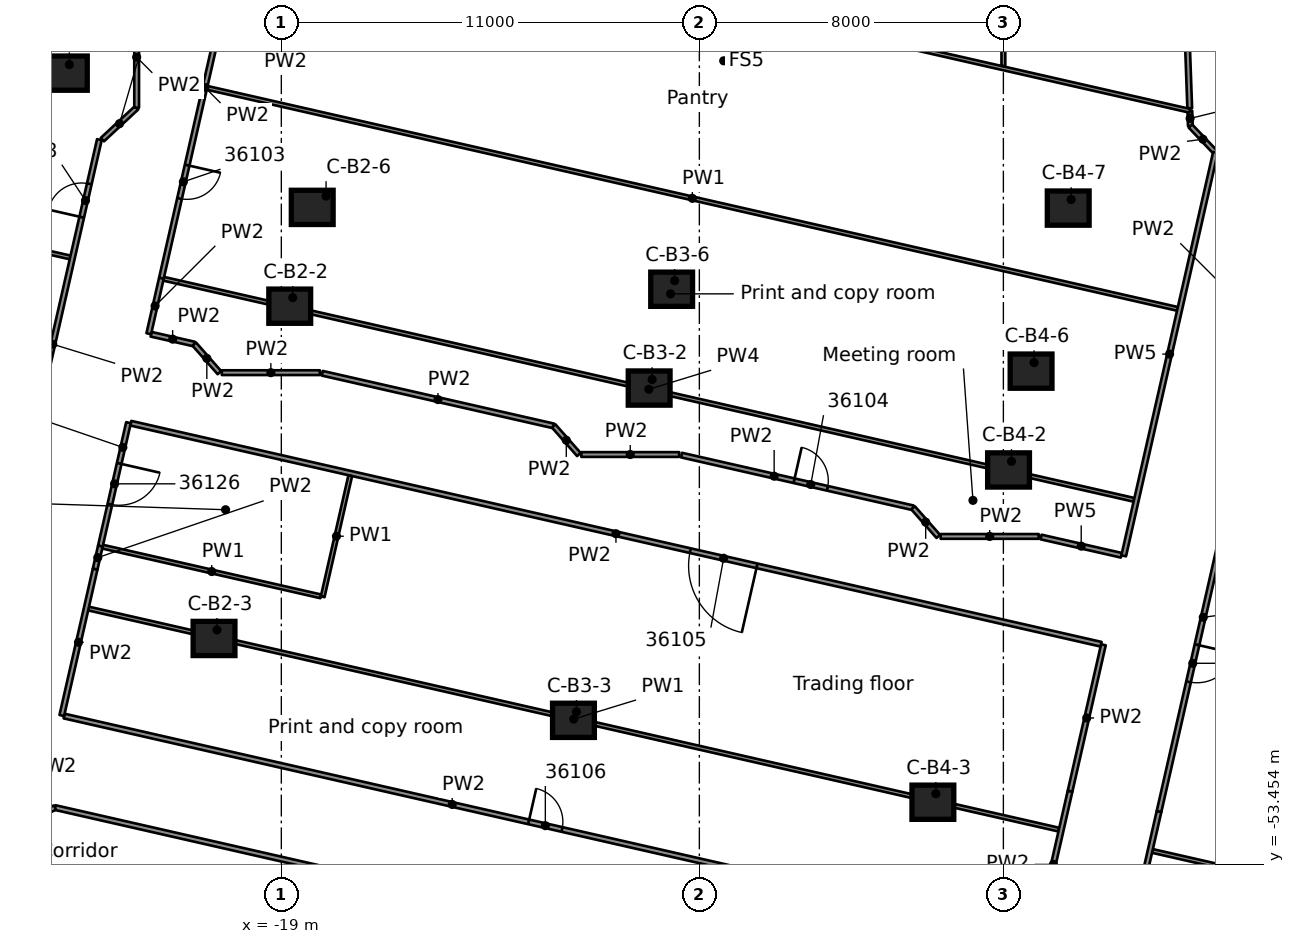
"""IFC4 building model, lengths in metres.
Left out: names, types, materials, properties, quantities, classifications, styles, units other than length and angle.
Written with IfcOpenShell. Run it as: python <this file> out.ifc"""

import sys

from ifc_helpers import new_model, si_unit, direction, frame, frame_2d, origin, origin_2d, place, context, subcontext, project, spatial, rectangle, extrude, element, fill, save


model = new_model("IFC4")
c1 = context("Model", 3, precision=1e-05, world=origin(), true_north=direction((0.0, 1.0)))
c2 = subcontext(c1, "Body", "Model", "MODEL_VIEW")
j1 = project(units=[si_unit("LENGTHUNIT", "METRE"), si_unit("PLANEANGLEUNIT", "RADIAN")], contexts=[c1])
p1 = place(None, origin())
s1 = spatial("IfcSite", under=j1, at=p1, CompositionType="ELEMENT")
p2 = place(p1, origin())
s2 = spatial("IfcBuilding", under=s1, at=p2, CompositionType="ELEMENT")
p3 = place(p2, frame((0.0, 0.0, 181.1)))
s3 = spatial("IfcBuildingStorey", under=s2, at=p3, CompositionType="ELEMENT", Elevation=181.1)
for number, where, z_axis, x_axis in (
    (1, (-24.657, -32.632, 0.0), (0.0, 0.0, 1.0), (1.0, 0.0, 0.0)),
    (2, (-18.779, -38.764, 0.0), (0.0, 0.0, 1.0), (1.0, 0.0, 0.0)),
    (3, (-20.771, -47.507, 0.0), (0.0, 0.0, 1.0), (1.0, 0.0, 0.0)),
    (4, (-18.187, -36.164, 0.0), (0.0, 0.0, 1.0), (1.0, 0.0, 0.0)),
    (5, (-9.321, -40.918, 0.0), (0.0, 0.0, 1.0), (1.0, 0.0, 0.0)),
    (6, (-11.313, -49.661, 0.0), (0.0, 0.0, 1.0), (1.0, 0.0, 0.0)),
    (7, (-8.729, -38.318, 0.0), (0.0, 0.0, 1.0), (1.0, 0.0, 0.0)),
    (8, (0.136, -43.073, 0.0), (0.0, 0.0, 1.0), (1.0, 0.0, 0.0)),
    (9, (-1.855, -51.816, 0.0), (0.0, 0.0, 1.0), (1.0, 0.0, 0.0)),
    (10, (0.729, -40.473, 0.0), (0.0, 0.0, 1.0), (1.0, 0.0, 0.0)),
    (11, (1.706, -36.183, 0.0), (0.0, 0.0, 1.0), (1.0, 0.0, 0.0)),
):
    element("IfcColumn", number, at=place(p3, frame(where, z_axis=z_axis, x_axis=x_axis)), inside=s3, PredefinedType="COLUMN", context=c2, shape_type="SweptSolid", body=[
        extrude(rectangle(XDim=1.1, YDim=0.9, at=origin_2d()), origin(), (0.0, 0.0, 1.0), 3.5),
    ])
p4 = place(p3, frame((4.907, -33.623, 0.0), z_axis=(0.0, 0.0, 1.0), x_axis=(0.034692866757, -0.999398021309, 0.0)))
e12 = element("IfcWall", 12, at=p4, inside=s3, PredefinedType="PARTITIONING", context=c2, shape_type="SweptSolid", body=[
    extrude(rectangle(XDim=0.401, YDim=0.125, at=frame_2d((0.201, 0.0))), origin(), (0.0, 0.0, 1.0), 3.06),
])
p5 = place(p3, frame((4.904, -33.555, 0.0), z_axis=(0.0, 0.0, 1.0), x_axis=(-0.035916720211, 0.999354786454, 0.0)))
e13 = element("IfcWall", 13, at=p5, inside=s3, PredefinedType="PARTITIONING", context=c2, shape_type="SweptSolid", body=[
    extrude(rectangle(XDim=17.904, YDim=0.125, at=frame_2d((8.952, 0.0))), origin(), (0.0, 0.0, 1.0), 2.425),
])
p6 = place(p5, frame((10.623, 0.0, 0.0)))
e14 = element("IfcOpeningElement", 14, at=p6, cuts=e13, PredefinedType="OPENING", context=c2, shape_type="SweptSolid", body=[
    extrude(rectangle(XDim=1.1, YDim=2.1, at=frame_2d((0.55, 1.05))), frame((0.0, 0.073, 0.0), z_axis=(0.0, -1.0, 0.0), x_axis=(1.0, 0.0, 0.0)), (0.0, 0.0, 1.0), 0.145),
])
p7 = place(p3, frame((0.344, -57.719, 0.0), z_axis=(0.0, 0.0, 1.0), x_axis=(-0.97501877272, 0.222122472621, 0.0)))
e15 = element("IfcWall", 15, at=p7, inside=s3, PredefinedType="PARTITIONING", context=c2, shape_type="SweptSolid", body=[
    extrude(rectangle(XDim=25.949, YDim=0.125, at=frame_2d((12.975, 0.0))), origin(), (0.0, 0.0, 1.0), 3.06),
])
p8 = place(p7, frame((12.6, 0.0, 0.0)))
e16 = element("IfcOpeningElement", 16, at=p8, cuts=e15, PredefinedType="OPENING", context=c2, shape_type="SweptSolid", body=[
    extrude(rectangle(XDim=0.9, YDim=2.1, at=frame_2d((0.45, 1.05))), frame((0.0, 0.073, 0.0), z_axis=(0.0, -1.0, 0.0), x_axis=(1.0, 0.0, 0.0)), (0.0, 0.0, 1.0), 0.145),
])
p9 = place(p3, frame((-24.716, -49.548, 0.0), z_axis=(0.0, 0.0, 1.0), x_axis=(0.975023843859, -0.222100211404, 0.0)))
e17 = element("IfcWall", 17, at=p9, inside=s3, PredefinedType="PARTITIONING", context=c2, shape_type="SweptSolid", body=[
    extrude(rectangle(XDim=26.186, YDim=0.125, at=frame_2d((13.093, 0.0))), origin(), (0.0, 0.0, 1.0), 3.06),
])
p10 = place(p9, frame((12.538, 0.0, 0.0)))
e18 = element("IfcOpeningElement", 18, at=p10, cuts=e17, PredefinedType="OPENING", context=c2, shape_type="SweptSolid", body=[
    extrude(rectangle(XDim=0.9, YDim=2.1, at=frame_2d((0.45, 1.05))), frame((0.0, 0.073, 0.0), z_axis=(0.0, -1.0, 0.0), x_axis=(1.0, 0.0, 0.0)), (0.0, 0.0, 1.0), 0.145),
])
p11 = place(p3, frame((-24.072, -46.72, 0.0), z_axis=(0.0, 0.0, 1.0), x_axis=(0.975013747988, -0.222144527805, 0.0)))
e19 = element("IfcWall", 19, at=p11, inside=s3, PredefinedType="PARTITIONING", context=c2, shape_type="SweptSolid", body=[
    extrude(rectangle(XDim=26.186, YDim=0.1, at=frame_2d((13.093, 0.0))), origin(), (0.0, 0.0, 1.0), 3.06),
])
p12 = place(p3, frame((3.923, -53.098, 0.0), z_axis=(0.0, 0.0, 1.0), x_axis=(0.975005836175, -0.222179250661, 0.0)))
e20 = element("IfcWall", 20, at=p12, inside=s3, PredefinedType="PARTITIONING", context=c2, shape_type="SweptSolid", body=[
    extrude(rectangle(XDim=4.632, YDim=0.1, at=frame_2d((2.316, 0.0))), origin(), (0.0, 0.0, 1.0), 3.06),
])
p13 = place(p3, frame((-23.701, -45.092, 0.0), z_axis=(0.0, 0.0, 1.0), x_axis=(0.9750468239, -0.22199930451, 0.0)))
e21 = element("IfcWall", 21, at=p13, inside=s3, PredefinedType="PARTITIONING", context=c2, shape_type="SweptSolid", body=[
    extrude(rectangle(XDim=5.887, YDim=0.1, at=frame_2d((2.943, 0.0))), origin(), (0.0, 0.0, 1.0), 3.06),
])
p14 = place(p3, frame((2.571, -47.659, 0.0), z_axis=(0.0, 0.0, 1.0), x_axis=(-0.975023843859, 0.222100211404, 0.0)))
e22 = element("IfcWall", 22, at=p14, inside=s3, PredefinedType="PARTITIONING", context=c2, shape_type="SweptSolid", body=[
    extrude(rectangle(XDim=26.186, YDim=0.125, at=frame_2d((13.093, 0.0))), origin(), (0.0, 0.0, 1.0), 3.06),
])
p15 = place(p14, frame((9.287, 0.0, 0.0)))
e23 = element("IfcOpeningElement", 23, at=p15, cuts=e22, PredefinedType="OPENING", context=c2, shape_type="SweptSolid", body=[
    extrude(rectangle(XDim=1.8, YDim=2.1, at=frame_2d((0.9, 1.05))), frame((0.0, 0.073, 0.0), z_axis=(0.0, -1.0, 0.0), x_axis=(1.0, 0.0, 0.0)), (0.0, 0.0, 1.0), 0.145),
])
p16 = place(p3, frame((-22.427, -39.502, 0.0), z_axis=(0.0, 0.0, 1.0), x_axis=(0.97511430892, -0.221702694026, 0.0)))
e24 = element("IfcWall", 24, at=p16, inside=s3, PredefinedType="PARTITIONING", context=c2, shape_type="SweptSolid", body=[
    extrude(rectangle(XDim=1.164, YDim=0.125, at=frame_2d((0.582, 0.0))), origin(), (0.0, 0.0, 1.0), 3.06),
])
p17 = place(p3, frame((-17.924, -40.528, 0.0), z_axis=(0.0, 0.0, 1.0), x_axis=(0.975041788435, -0.2220214197, 0.0)))
e25 = element("IfcWall", 25, at=p17, inside=s3, PredefinedType="PARTITIONING", context=c2, shape_type="SweptSolid", body=[
    extrude(rectangle(XDim=6.247, YDim=0.125, at=frame_2d((3.124, 0.0))), origin(), (0.0, 0.0, 1.0), 3.06),
])
p18 = place(p3, frame((-8.469, -42.682, 0.0), z_axis=(0.0, 0.0, 1.0), x_axis=(0.975048737106, -0.22199090132, 0.0)))
e26 = element("IfcWall", 26, at=p18, inside=s3, PredefinedType="PARTITIONING", context=c2, shape_type="SweptSolid", body=[
    extrude(rectangle(XDim=6.249, YDim=0.125, at=frame_2d((3.125, 0.0))), origin(), (0.0, 0.0, 1.0), 3.06),
])
p19 = place(p18, frame((3.038, 0.0, 0.0)))
e27 = element("IfcOpeningElement", 27, at=p19, cuts=e26, PredefinedType="OPENING", context=c2, shape_type="SweptSolid", body=[
    extrude(rectangle(XDim=0.9, YDim=2.1, at=frame_2d((0.45, 1.05))), frame((0.0, 0.073, 0.0), z_axis=(0.0, -1.0, 0.0), x_axis=(1.0, 0.0, 0.0)), (0.0, 0.0, 1.0), 0.145),
])
p20 = place(p3, frame((0.991, -44.837, 0.0), z_axis=(0.0, 0.0, 1.0), x_axis=(0.97505868901, -0.22194718513, 0.0)))
e28 = element("IfcWall", 28, at=p20, inside=s3, PredefinedType="PARTITIONING", context=c2, shape_type="SweptSolid", body=[
    extrude(rectangle(XDim=2.168, YDim=0.125, at=frame_2d((1.084, 0.0))), origin(), (0.0, 0.0, 1.0), 2.425),
])
p21 = place(p3, frame((-29.073, -36.453, 0.0), z_axis=(0.0, 0.0, 1.0), x_axis=(0.975041099452, -0.222024445455, 0.0)))
e29 = element("IfcWall", 29, at=p21, inside=s3, PredefinedType="PARTITIONING", context=c2, shape_type="SweptSolid", body=[
    extrude(rectangle(XDim=4.63, YDim=0.1, at=frame_2d((2.315, 0.0))), origin(), (0.0, 0.0, 1.0), 3.06),
])
p22 = place(p3, frame((-22.095, -38.043, 0.0), z_axis=(0.0, 0.0, 1.0), x_axis=(0.975023843859, -0.222100211404, 0.0)))
e30 = element("IfcWall", 30, at=p22, inside=s3, PredefinedType="PARTITIONING", context=c2, shape_type="SweptSolid", body=[
    extrude(rectangle(XDim=26.186, YDim=0.1, at=frame_2d((13.093, 0.0))), origin(), (0.0, 0.0, 1.0), 2.425),
])
p23 = place(p3, frame((-20.951, -33.019, 0.0), z_axis=(0.0, 0.0, 1.0), x_axis=(0.975025683381, -0.222092135715, 0.0)))
e31 = element("IfcWall", 31, at=p23, inside=s3, PredefinedType="PARTITIONING", context=c2, shape_type="SweptSolid", body=[
    extrude(rectangle(XDim=26.187, YDim=0.1, at=frame_2d((13.094, 0.0))), origin(), (0.0, 0.0, 1.0), 3.06),
])
p24 = place(p3, frame((-19.806, -27.994, 0.0), z_axis=(0.0, 0.0, 1.0), x_axis=(0.975023541408, -0.222101539165, 0.0)))
e32 = element("IfcWall", 32, at=p24, inside=s3, PredefinedType="PARTITIONING", context=c2, shape_type="SweptSolid", body=[
    extrude(rectangle(XDim=25.345, YDim=0.1, at=frame_2d((12.672, 0.0))), origin(), (0.0, 0.0, 1.0), 3.06),
])
p25 = place(p3, frame((-1.651, -44.822, 0.0), z_axis=(0.0, 0.0, 1.0), x_axis=(1.0, 0.0, 0.0)))
e33 = element("IfcWall", 33, at=p25, inside=s3, PredefinedType="PARTITIONING", context=c2, shape_type="SweptSolid", body=[
    extrude(rectangle(XDim=2.581, YDim=0.125, at=frame_2d((1.291, 0.0))), origin(), (0.0, 0.0, 1.0), 3.06),
])
p26 = place(p3, frame((-11.107, -42.667, 0.0), z_axis=(0.0, 0.0, 1.0), x_axis=(1.0, 0.0, 0.0)))
e34 = element("IfcWall", 34, at=p26, inside=s3, PredefinedType="PARTITIONING", context=c2, shape_type="SweptSolid", body=[
    extrude(rectangle(XDim=2.577, YDim=0.125, at=frame_2d((1.289, 0.0))), origin(), (0.0, 0.0, 1.0), 3.06),
])
p27 = place(p3, frame((-20.567, -40.513, 0.0), z_axis=(0.0, 0.0, 1.0), x_axis=(1.0, 0.0, 0.0)))
e35 = element("IfcWall", 35, at=p27, inside=s3, PredefinedType="PARTITIONING", context=c2, shape_type="SweptSolid", body=[
    extrude(rectangle(XDim=2.582, YDim=0.125, at=frame_2d((1.291, 0.0))), origin(), (0.0, 0.0, 1.0), 3.06),
])
p28 = place(p3, frame((-23.709, -34.381, 0.0), z_axis=(0.0, 0.0, 1.0), x_axis=(0.732207421562, 0.681081707147, 0.0)))
e36 = element("IfcWall", 36, at=p28, inside=s3, PredefinedType="PARTITIONING", context=c2, shape_type="SweptSolid", body=[
    extrude(rectangle(XDim=1.232, YDim=0.125, at=frame_2d((0.616, 0.0))), origin(), (0.0, 0.0, 1.0), 3.06),
])
p29 = place(p3, frame((4.922, -34.024, 0.0), z_axis=(0.0, 0.0, 1.0), x_axis=(0.689011074604, -0.724750811709, 0.0)))
e37 = element("IfcWall", 37, at=p29, inside=s3, PredefinedType="PARTITIONING", context=c2, shape_type="SweptSolid", body=[
    extrude(rectangle(XDim=0.956, YDim=0.125, at=frame_2d((0.478, 0.0))), origin(), (0.0, 0.0, 1.0), 3.06),
])
p30 = place(p3, frame((4.096, -52.059, 0.0), z_axis=(0.0, 0.0, 1.0), x_axis=(-0.222267590123, -0.974985701629, 0.0)))
e38 = element("IfcWall", 38, at=p30, inside=s3, PredefinedType="PARTITIONING", context=c2, shape_type="SweptSolid", body=[
    extrude(rectangle(XDim=5.092, YDim=0.125, at=frame_2d((2.546, 0.0))), origin(), (0.0, 0.0, 1.0), 3.06),
])
p31 = place(p3, frame((-25.377, -52.167, 0.0), z_axis=(0.0, 0.0, 1.0), x_axis=(0.892760073249, 0.450532409058, 0.0)))
e39 = element("IfcWall", 39, at=p31, inside=s3, PredefinedType="PARTITIONING", context=c2, shape_type="SweptSolid", body=[
    extrude(rectangle(XDim=0.47, YDim=0.125, at=frame_2d((0.235, 0.0))), origin(), (0.0, 0.0, 1.0), 3.06),
])
p32 = place(p3, frame((-23.899, -45.681, 0.0), z_axis=(0.0, 0.0, 1.0), x_axis=(-0.222219189768, -0.974996734199, 0.0)))
e40 = element("IfcWall", 40, at=p32, inside=s3, PredefinedType="PARTITIONING", context=c2, shape_type="SweptSolid", body=[
    extrude(rectangle(XDim=3.952, YDim=0.125, at=frame_2d((1.976, 0.0))), origin(), (0.0, 0.0, 1.0), 3.06),
])
p33 = place(p3, frame((6.423, -41.842, 0.0), z_axis=(0.0, 0.0, 1.0), x_axis=(-0.222083299456, -0.97502769607, 0.0)))
e41 = element("IfcWall", 41, at=p33, inside=s3, PredefinedType="PARTITIONING", context=c2, shape_type="SweptSolid", body=[
    extrude(rectangle(XDim=10.479, YDim=0.125, at=frame_2d((5.239, 0.0))), origin(), (0.0, 0.0, 1.0), 2.425),
])
p34 = place(p33, frame((5.98, 0.0, 0.0)))
e42 = element("IfcOpeningElement", 42, at=p34, cuts=e41, PredefinedType="OPENING", context=c2, shape_type="SweptSolid", body=[
    extrude(rectangle(XDim=1.0, YDim=2.1, at=frame_2d((0.5, 1.05))), frame((0.0, 0.073, 0.0), z_axis=(0.0, -1.0, 0.0), x_axis=(1.0, 0.0, 0.0)), (0.0, 0.0, 1.0), 0.145),
])
p35 = place(p3, frame((1.755, -51.525, 0.0), z_axis=(0.0, 0.0, 1.0), x_axis=(-0.222160460256, -0.975010117844, 0.0)))
e43 = element("IfcWall", 43, at=p35, inside=s3, PredefinedType="PARTITIONING", context=c2, shape_type="SweptSolid", body=[
    extrude(rectangle(XDim=3.952, YDim=0.125, at=frame_2d((1.976, 0.0))), origin(), (0.0, 0.0, 1.0), 3.06),
])
p36 = place(p3, frame((1.755, -51.525, 0.0), z_axis=(0.0, 0.0, 1.0), x_axis=(0.222286135557, 0.974981473639, 0.0)))
e44 = element("IfcWall", 44, at=p36, inside=s3, PredefinedType="PARTITIONING", context=c2, shape_type="SweptSolid", body=[
    extrude(rectangle(XDim=3.951, YDim=0.125, at=frame_2d((1.975, 0.0))), origin(), (0.0, 0.0, 1.0), 3.06),
])
p37 = place(p3, frame((3.166, -45.332, 0.0), z_axis=(0.0, 0.0, 1.0), x_axis=(0.221843071865, 0.975082381887, 0.0)))
e45 = element("IfcWall", 45, at=p37, inside=s3, PredefinedType="PARTITIONING", context=c2, shape_type="SweptSolid", body=[
    extrude(rectangle(XDim=10.886, YDim=0.125, at=frame_2d((5.443, 0.0))), origin(), (0.0, 0.0, 1.0), 2.425),
])
p38 = place(p3, frame((-17.912, -46.41, 0.0), z_axis=(0.0, 0.0, 1.0), x_axis=(0.222131144085, 0.975016797203, 0.0)))
e46 = element("IfcWall", 46, at=p38, inside=s3, PredefinedType="PARTITIONING", context=c2, shape_type="SweptSolid", body=[
    extrude(rectangle(XDim=3.269, YDim=0.1, at=frame_2d((1.634, 0.0))), origin(), (0.0, 0.0, 1.0), 3.06),
])
p39 = place(p3, frame((-23.022, -41.829, 0.0), z_axis=(0.0, 0.0, 1.0), x_axis=(-0.222150102986, -0.975012477737, 0.0)))
e47 = element("IfcWall", 47, at=p39, inside=s3, PredefinedType="PARTITIONING", context=c2, shape_type="SweptSolid", body=[
    extrude(rectangle(XDim=3.331, YDim=0.125, at=frame_2d((1.666, 0.0))), origin(), (0.0, 0.0, 1.0), 3.06),
])
p40 = place(p39, frame((1.1, 0.0, 0.0)))
e48 = element("IfcOpeningElement", 48, at=p40, cuts=e47, PredefinedType="OPENING", context=c2, shape_type="SweptSolid", body=[
    extrude(rectangle(XDim=1.1, YDim=2.1, at=frame_2d((0.55, 1.05))), frame((0.0, 0.073, 0.0), z_axis=(0.0, -1.0, 0.0), x_axis=(1.0, 0.0, 0.0)), (0.0, 0.0, 1.0), 0.145),
])
p41 = place(p3, frame((-19.868, -27.982, 0.0), z_axis=(0.0, 0.0, 1.0), x_axis=(-0.222050161604, -0.975035243328, 0.0)))
e49 = element("IfcWall", 49, at=p41, inside=s3, PredefinedType="PARTITIONING", context=c2, shape_type="SweptSolid", body=[
    extrude(rectangle(XDim=10.304, YDim=0.125, at=frame_2d((5.152, 0.0))), origin(), (0.0, 0.0, 1.0), 3.06),
])
p42 = place(p41, frame((2.098, 0.0, 0.0)))
e50 = element("IfcOpeningElement", 50, at=p42, cuts=e49, PredefinedType="OPENING", context=c2, shape_type="SweptSolid", body=[
    extrude(rectangle(XDim=0.9, YDim=2.1, at=frame_2d((0.45, 1.05))), frame((0.0, 0.073, 0.0), z_axis=(0.0, -1.0, 0.0), x_axis=(1.0, 0.0, 0.0)), (0.0, 0.0, 1.0), 0.145),
])
p43 = place(p41, frame((7.252, 0.0, 0.0)))
e51 = element("IfcOpeningElement", 51, at=p43, cuts=e49, PredefinedType="OPENING", context=c2, shape_type="SweptSolid", body=[
    extrude(rectangle(XDim=0.9, YDim=2.1, at=frame_2d((0.45, 1.05))), frame((0.0, 0.073, 0.0), z_axis=(0.0, -1.0, 0.0), x_axis=(1.0, 0.0, 0.0)), (0.0, 0.0, 1.0), 0.145),
])
p44 = place(p3, frame((-23.899, -45.681, 0.0), z_axis=(0.0, 0.0, 1.0), x_axis=(0.221484587938, 0.975163872027, 0.0)))
e52 = element("IfcWall", 52, at=p44, inside=s3, PredefinedType="PARTITIONING", context=c2, shape_type="SweptSolid", body=[
    extrude(rectangle(XDim=0.618, YDim=0.125, at=frame_2d((0.309, 0.0))), origin(), (0.0, 0.0, 1.0), 3.06),
])
p45 = place(p3, frame((-22.488, -39.488, 0.0), z_axis=(0.0, 0.0, 1.0), x_axis=(0.221903185503, 0.975068703356, 0.0)))
e53 = element("IfcWall", 53, at=p45, inside=s3, PredefinedType="PARTITIONING", context=c2, shape_type="SweptSolid", body=[
    extrude(rectangle(XDim=1.496, YDim=0.125, at=frame_2d((0.748, 0.0))), origin(), (0.0, 0.0, 1.0), 3.06),
])
p46 = place(p3, frame((-26.24, -45.148, 0.0), z_axis=(0.0, 0.0, 1.0), x_axis=(0.22206165199, 0.975032626488, 0.0)))
e54 = element("IfcWall", 54, at=p46, inside=s3, PredefinedType="PARTITIONING", context=c2, shape_type="SweptSolid", body=[
    extrude(rectangle(XDim=11.042, YDim=0.125, at=frame_2d((5.521, 0.0))), origin(), (0.0, 0.0, 1.0), 3.06),
])
p47 = place(p46, frame((8.949, 0.0, 0.0)))
e55 = element("IfcOpeningElement", 55, at=p47, cuts=e54, PredefinedType="OPENING", context=c2, shape_type="SweptSolid", body=[
    extrude(rectangle(XDim=0.9, YDim=2.1, at=frame_2d((0.45, 1.05))), frame((0.0, 0.073, 0.0), z_axis=(0.0, -1.0, 0.0), x_axis=(1.0, 0.0, 0.0)), (0.0, 0.0, 1.0), 0.145),
])
p48 = place(p46, frame((3.1, 0.0, 0.0)))
e56 = element("IfcOpeningElement", 56, at=p48, cuts=e54, PredefinedType="OPENING", context=c2, shape_type="SweptSolid", body=[
    extrude(rectangle(XDim=1.8, YDim=2.1, at=frame_2d((0.9, 1.05))), frame((0.0, 0.073, 0.0), z_axis=(0.0, -1.0, 0.0), x_axis=(1.0, 0.0, 0.0)), (0.0, 0.0, 1.0), 0.145),
])
p49 = place(p3, frame((0.0, -32.442, 0.0), z_axis=(0.0, 0.0, 1.0), x_axis=(0.0, 1.0, 0.0)))
e57 = element("IfcWall", 57, at=p49, inside=s3, PredefinedType="PARTITIONING", context=c2, shape_type="SweptSolid", body=[
    extrude(rectangle(XDim=16.78, YDim=0.1, at=frame_2d((8.39, 0.0))), origin(), (0.0, 0.0, 1.0), 3.06),
])
p50 = place(p3, frame((-1.713, -44.822, 0.0), z_axis=(0.0, 0.0, 1.0), x_axis=(-0.660913097692, 0.750462442298, 0.0)))
e58 = element("IfcWall", 58, at=p50, inside=s3, PredefinedType="PARTITIONING", context=c2, shape_type="SweptSolid", body=[
    extrude(rectangle(XDim=1.003, YDim=0.125, at=frame_2d((0.501, 0.0))), origin(), (0.0, 0.0, 1.0), 3.06),
])
p51 = place(p3, frame((-11.17, -42.667, 0.0), z_axis=(0.0, 0.0, 1.0), x_axis=(-0.66139609203, 0.750036805395, 0.0)))
e59 = element("IfcWall", 59, at=p51, inside=s3, PredefinedType="PARTITIONING", context=c2, shape_type="SweptSolid", body=[
    extrude(rectangle(XDim=1.002, YDim=0.125, at=frame_2d((0.501, 0.0))), origin(), (0.0, 0.0, 1.0), 3.06),
])
p52 = place(p3, frame((-20.629, -40.513, 0.0), z_axis=(0.0, 0.0, 1.0), x_axis=(-0.660913097692, 0.750462442298, 0.0)))
e60 = element("IfcWall", 60, at=p52, inside=s3, PredefinedType="PARTITIONING", context=c2, shape_type="SweptSolid", body=[
    extrude(rectangle(XDim=1.003, YDim=0.125, at=frame_2d((0.501, 0.0))), origin(), (0.0, 0.0, 1.0), 3.06),
])
p53 = place(p3, frame((-22.807, -33.542, 0.0), z_axis=(0.0, 0.0, 1.0), x_axis=(0.0, 1.0, 0.0)))
e61 = element("IfcWall", 61, at=p53, inside=s3, PredefinedType="PARTITIONING", context=c2, shape_type="SweptSolid", body=[
    extrude(rectangle(XDim=2.66, YDim=0.125, at=frame_2d((1.33, 0.0))), origin(), (0.0, 0.0, 1.0), 3.06),
])
p54 = place(p34, origin())
e62 = element("IfcDoor", 62, at=p54, inside=s3, OperationType="SINGLE_SWING_RIGHT", PredefinedType="DOOR", context=c2, shape_type="SweptSolid", body=[
    extrude(rectangle(XDim=1.0, YDim=2.1, at=frame_2d((0.5, 1.05))), frame((0.0, 0.025, 0.0), z_axis=(0.0, -1.0, 0.0), x_axis=(1.0, 0.0, 0.0)), (0.0, 0.0, 1.0), 0.05),
])
fill(e42, e62)
p55 = place(p43, origin())
e63 = element("IfcDoor", 63, at=p55, inside=s3, OperationType="SINGLE_SWING_RIGHT", PredefinedType="DOOR", context=c2, shape_type="SweptSolid", body=[
    extrude(rectangle(XDim=0.9, YDim=2.1, at=frame_2d((0.45, 1.05))), frame((0.0, 0.025, 0.0), z_axis=(0.0, -1.0, 0.0), x_axis=(1.0, 0.0, 0.0)), (0.0, 0.0, 1.0), 0.05),
])
fill(e51, e63)
p56 = place(p19, origin())
e64 = element("IfcDoor", 64, at=p56, inside=s3, OperationType="SINGLE_SWING_RIGHT", PredefinedType="DOOR", context=c2, shape_type="SweptSolid", body=[
    extrude(rectangle(XDim=0.9, YDim=2.1, at=frame_2d((0.45, 1.05))), frame((0.0, 0.025, 0.0), z_axis=(0.0, -1.0, 0.0), x_axis=(1.0, 0.0, 0.0)), (0.0, 0.0, 1.0), 0.05),
])
fill(e27, e64)
p57 = place(p15, origin())
e65 = element("IfcDoor", 65, at=p57, inside=s3, OperationType="DOUBLE_DOOR_SINGLE_SWING", PredefinedType="DOOR", context=c2, shape_type="SweptSolid", body=[
    extrude(rectangle(XDim=1.8, YDim=2.1, at=frame_2d((0.9, 1.05))), frame((0.0, 0.025, 0.0), z_axis=(0.0, -1.0, 0.0), x_axis=(1.0, 0.0, 0.0)), (0.0, 0.0, 1.0), 0.05),
])
fill(e23, e65)
p58 = place(p10, origin())
e66 = element("IfcDoor", 66, at=p58, inside=s3, OperationType="SINGLE_SWING_LEFT", PredefinedType="DOOR", context=c2, shape_type="SweptSolid", body=[
    extrude(rectangle(XDim=0.9, YDim=2.1, at=frame_2d((0.45, 1.05))), frame((0.0, 0.025, 0.0), z_axis=(0.0, -1.0, 0.0), x_axis=(1.0, 0.0, 0.0)), (0.0, 0.0, 1.0), 0.05),
])
fill(e18, e66)
p59 = place(p47, origin())
e67 = element("IfcDoor", 67, at=p59, inside=s3, OperationType="SINGLE_SWING_RIGHT", PredefinedType="DOOR", context=c2, shape_type="SweptSolid", body=[
    extrude(rectangle(XDim=0.9, YDim=2.1, at=frame_2d((0.45, 1.05))), frame((0.0, 0.025, 0.0), z_axis=(0.0, -1.0, 0.0), x_axis=(1.0, 0.0, 0.0)), (0.0, 0.0, 1.0), 0.05),
])
fill(e55, e67)
p60 = place(p40, origin())
e68 = element("IfcDoor", 68, at=p60, inside=s3, OperationType="SINGLE_SWING_LEFT", PredefinedType="DOOR", context=c2, shape_type="SweptSolid", body=[
    extrude(rectangle(XDim=1.1, YDim=2.1, at=frame_2d((0.55, 1.05))), frame((0.0, 0.025, 0.0), z_axis=(0.0, -1.0, 0.0), x_axis=(1.0, 0.0, 0.0)), (0.0, 0.0, 1.0), 0.05),
])
fill(e48, e68)
save(model, sys.argv[1])
